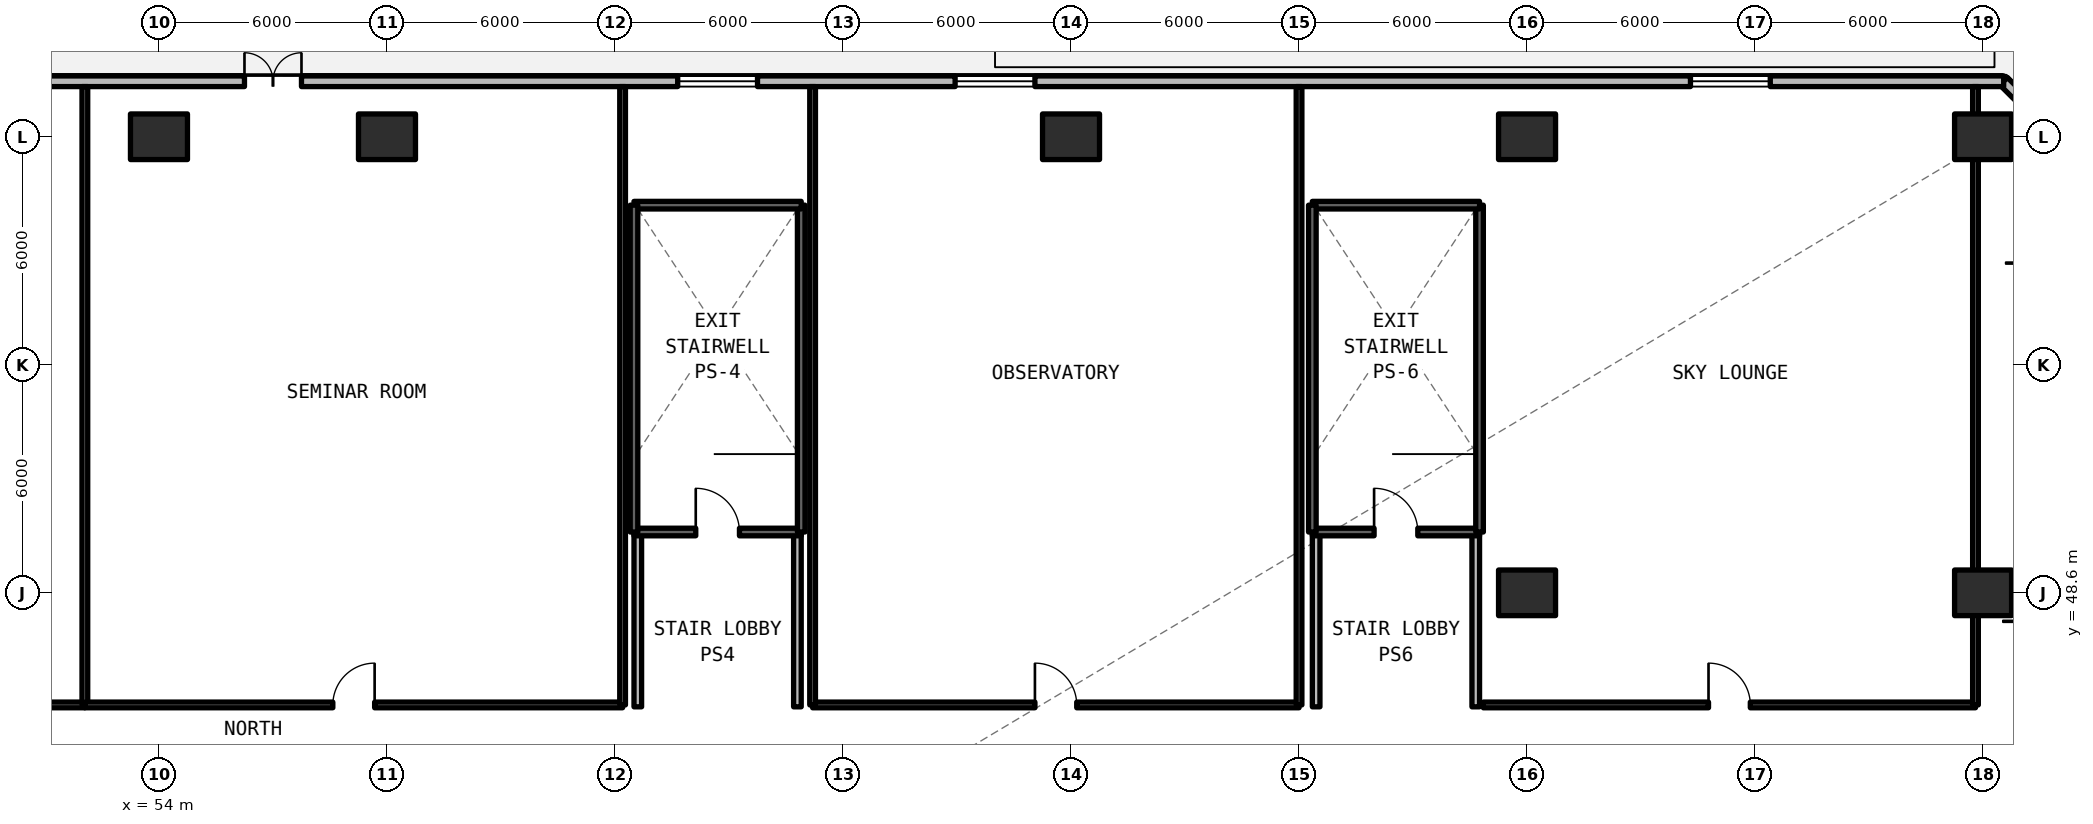
"""IFC4 building model, lengths in metres.
Left out: names, types, materials, properties, quantities, classifications, styles, units other than length and angle.
Written with IfcOpenShell. Run it as: python <this file> out.ifc"""

import sys

from ifc_helpers import new_model, si_unit, direction, frame, frame_2d, origin, origin_2d, place, context, subcontext, project, spatial, rectangle, extrude, element, fill, save


model = new_model("IFC4")
c1 = context("Model", 3, precision=1e-05, world=origin(), true_north=direction((0.0, 1.0)))
c2 = subcontext(c1, "Body", "Model", "MODEL_VIEW")
j1 = project(units=[si_unit("LENGTHUNIT", "METRE"), si_unit("PLANEANGLEUNIT", "RADIAN")], contexts=[c1])
p1 = place(None, origin())
s1 = spatial("IfcSite", under=j1, at=p1, CompositionType="ELEMENT")
p2 = place(p1, origin())
s2 = spatial("IfcBuilding", under=s1, at=p2, CompositionType="ELEMENT")
p3 = place(p2, frame((0.0, 0.0, 24.09)))
s3 = spatial("IfcBuildingStorey", under=s2, at=p3, CompositionType="ELEMENT", Elevation=24.09)
for number, where, z_axis, x_axis in (
    (1, (54.0, 60.6, 0.0), (0.0, 0.0, 1.0), (1.0, 0.0, 0.0)),
    (2, (60.0, 60.6, 0.0), (0.0, 0.0, 1.0), (1.0, 0.0, 0.0)),
    (3, (78.0, 60.6, 0.0), (0.0, 0.0, 1.0), (1.0, 0.0, 0.0)),
    (4, (90.0, 60.6, 0.0), (0.0, 0.0, 1.0), (1.0, 0.0, 0.0)),
    (5, (102.0, 60.6, 0.0), (0.0, 0.0, 1.0), (1.0, 0.0, 0.0)),
):
    element("IfcColumn", number, at=place(p3, frame(where, z_axis=z_axis, x_axis=x_axis)), inside=s3, PredefinedType="COLUMN", context=c2, shape_type="SweptSolid", body=[
        extrude(rectangle(XDim=1.5, YDim=1.2, at=origin_2d()), origin(), (0.0, 0.0, 1.0), 4.71),
    ])
p4 = place(p3, frame((90.0, 48.6, 0.0), z_axis=(0.0, 0.0, 1.0), x_axis=(1.0, 0.0, 0.0)))
e6 = element("IfcColumn", 6, at=p4, inside=s3, PredefinedType="COLUMN", context=c2, shape_type="SweptSolid", body=[
    extrude(rectangle(XDim=1.5, YDim=1.2, at=origin_2d()), origin(), (0.0, 0.0, 1.0), 4.95),
])
p5 = place(p3, frame((102.0, 48.6, 0.0), z_axis=(0.0, 0.0, 1.0), x_axis=(1.0, 0.0, 0.0)))
e7 = element("IfcColumn", 7, at=p5, inside=s3, PredefinedType="COLUMN", context=c2, shape_type="SweptSolid", body=[
    extrude(rectangle(XDim=1.5, YDim=1.2, at=origin_2d()), origin(), (0.0, 0.0, 1.0), 4.71),
])
p6 = place(p3, frame((104.86, 59.742, 0.0), z_axis=(0.0, 0.0, 1.0), x_axis=(-0.707106781187, 0.707106781187, 0.0)))
e8 = element("IfcWall", 8, at=p6, inside=s3, PredefinedType="SOLIDWALL", context=c2, shape_type="SweptSolid", body=[
    extrude(rectangle(XDim=3.278, YDim=0.28, at=frame_2d((1.639, 0.0))), origin(), (0.0, 0.0, 1.0), 4.71),
])
p7 = place(p6, frame((0.894, 0.0, 0.78)))
e9 = element("IfcOpeningElement", 9, at=p7, cuts=e8, PredefinedType="OPENING", context=c2, shape_type="SweptSolid", body=[
    extrude(rectangle(XDim=0.85, YDim=1.65, at=frame_2d((0.425, 0.825))), frame((0.0, 0.15, 0.0), z_axis=(0.0, -1.0, 0.0), x_axis=(1.0, 0.0, 0.0)), (0.0, 0.0, 1.0), 0.3),
])
p8 = place(p3, frame((102.542, 62.06, 0.0), z_axis=(0.0, 0.0, 1.0), x_axis=(-1.0, 0.0, 0.0)))
e10 = element("IfcWall", 10, at=p8, inside=s3, PredefinedType="SOLIDWALL", context=c2, shape_type="SweptSolid", body=[
    extrude(rectangle(XDim=91.084, YDim=0.28, at=frame_2d((45.542, 0.0))), origin(), (0.0, 0.0, 1.0), 4.71),
])
p9 = place(p8, frame((44.792, 0.0, 0.0)))
e11 = element("IfcOpeningElement", 11, at=p9, cuts=e10, PredefinedType="OPENING", context=c2, shape_type="SweptSolid", body=[
    extrude(rectangle(XDim=1.5, YDim=2.2, at=frame_2d((0.75, 1.1))), frame((0.0, 0.15, 0.0), z_axis=(0.0, -1.0, 0.0), x_axis=(1.0, 0.0, 0.0)), (0.0, 0.0, 1.0), 0.3),
])
p10 = place(p8, frame((60.392, 0.0, 0.78)))
e12 = element("IfcOpeningElement", 12, at=p10, cuts=e10, PredefinedType="OPENING", context=c2, shape_type="SweptSolid", body=[
    extrude(rectangle(XDim=2.1, YDim=1.66, at=frame_2d((1.05, 0.83))), frame((0.0, 0.15, 0.0), z_axis=(0.0, -1.0, 0.0), x_axis=(1.0, 0.0, 0.0)), (0.0, 0.0, 1.0), 0.3),
])
p11 = place(p8, frame((25.492, 0.0, 0.78)))
e13 = element("IfcOpeningElement", 13, at=p11, cuts=e10, PredefinedType="OPENING", context=c2, shape_type="SweptSolid", body=[
    extrude(rectangle(XDim=2.1, YDim=1.66, at=frame_2d((1.05, 0.83))), frame((0.0, 0.15, 0.0), z_axis=(0.0, -1.0, 0.0), x_axis=(1.0, 0.0, 0.0)), (0.0, 0.0, 1.0), 0.3),
])
p12 = place(p8, frame((83.092, 0.0, 0.78)))
e14 = element("IfcOpeningElement", 14, at=p12, cuts=e10, PredefinedType="OPENING", context=c2, shape_type="SweptSolid", body=[
    extrude(rectangle(XDim=2.1, YDim=1.66, at=frame_2d((1.05, 0.83))), frame((0.0, 0.15, 0.0), z_axis=(0.0, -1.0, 0.0), x_axis=(1.0, 0.0, 0.0)), (0.0, 0.0, 1.0), 0.3),
])
p13 = place(p8, frame((6.142, 0.0, 0.78)))
e15 = element("IfcOpeningElement", 15, at=p13, cuts=e10, PredefinedType="OPENING", context=c2, shape_type="SweptSolid", body=[
    extrude(rectangle(XDim=2.1, YDim=1.66, at=frame_2d((1.05, 0.83))), frame((0.0, 0.15, 0.0), z_axis=(0.0, -1.0, 0.0), x_axis=(1.0, 0.0, 0.0)), (0.0, 0.0, 1.0), 0.3),
])
p14 = place(p8, frame((32.792, 0.0, 0.78)))
e16 = element("IfcOpeningElement", 16, at=p14, cuts=e10, PredefinedType="OPENING", context=c2, shape_type="SweptSolid", body=[
    extrude(rectangle(XDim=2.1, YDim=1.66, at=frame_2d((1.05, 0.83))), frame((0.0, 0.15, 0.0), z_axis=(0.0, -1.0, 0.0), x_axis=(1.0, 0.0, 0.0)), (0.0, 0.0, 1.0), 0.3),
])
p15 = place(p8, frame((74.092, 0.0, 0.78)))
e17 = element("IfcOpeningElement", 17, at=p15, cuts=e10, PredefinedType="OPENING", context=c2, shape_type="SweptSolid", body=[
    extrude(rectangle(XDim=2.1, YDim=1.66, at=frame_2d((1.05, 0.83))), frame((0.0, 0.15, 0.0), z_axis=(0.0, -1.0, 0.0), x_axis=(1.0, 0.0, 0.0)), (0.0, 0.0, 1.0), 0.3),
])
p16 = place(p8, frame((53.992, 0.0, 0.78)))
e18 = element("IfcOpeningElement", 18, at=p16, cuts=e10, PredefinedType="OPENING", context=c2, shape_type="SweptSolid", body=[
    extrude(rectangle(XDim=2.1, YDim=1.66, at=frame_2d((1.05, 0.83))), frame((0.0, 0.15, 0.0), z_axis=(0.0, -1.0, 0.0), x_axis=(1.0, 0.0, 0.0)), (0.0, 0.0, 1.0), 0.3),
])
p17 = place(p8, frame((63.492, 0.0, 0.78)))
e19 = element("IfcOpeningElement", 19, at=p17, cuts=e10, PredefinedType="OPENING", context=c2, shape_type="SweptSolid", body=[
    extrude(rectangle(XDim=2.1, YDim=1.66, at=frame_2d((1.05, 0.83))), frame((0.0, 0.15, 0.0), z_axis=(0.0, -1.0, 0.0), x_axis=(1.0, 0.0, 0.0)), (0.0, 0.0, 1.0), 0.3),
])
for number, where, z_axis, x_axis in (
    (20, (66.6, 45.6, 0.0), (0.0, 0.0, 1.0), (0.0, 1.0, 0.0)),
    (21, (70.8, 45.6, 0.0), (0.0, 0.0, 1.0), (0.0, 1.0, 0.0)),
    (22, (84.45, 45.6, 0.0), (0.0, 0.0, 1.0), (0.0, 1.0, 0.0)),
    (23, (88.65, 45.6, 0.0), (0.0, 0.0, 1.0), (0.0, 1.0, 0.0)),
):
    element("IfcWall", number, at=place(p3, frame(where, z_axis=z_axis, x_axis=x_axis)), inside=s3, PredefinedType="SOLIDWALL", context=c2, shape_type="SweptSolid", body=[
        extrude(rectangle(XDim=4.6, YDim=0.2, at=frame_2d((2.3, 0.0))), origin(), (0.0, 0.0, 1.0), 3.93),
    ])
p18 = place(p3, frame((30.2, 45.65, 0.0), z_axis=(0.0, 0.0, 1.0), x_axis=(1.0, 0.0, 0.0)))
e24 = element("IfcWall", 24, at=p18, inside=s3, PredefinedType="SOLIDWALL", context=c2, shape_type="SweptSolid", body=[
    extrude(rectangle(XDim=21.85, YDim=0.15, at=frame_2d((10.925, 0.0))), origin(), (0.0, 0.0, 1.0), 3.93),
])
p19 = place(p18, frame((10.225, 0.0, 0.0)))
e25 = element("IfcOpeningElement", 25, at=p19, cuts=e24, PredefinedType="OPENING", context=c2, shape_type="SweptSolid", body=[
    extrude(rectangle(XDim=1.4, YDim=2.15, at=frame_2d((0.7, 1.075))), frame((0.0, 0.085, 0.0), z_axis=(0.0, -1.0, 0.0), x_axis=(1.0, 0.0, 0.0)), (0.0, 0.0, 1.0), 0.17),
])
p20 = place(p3, frame((52.05, 45.65, 0.0), z_axis=(0.0, 0.0, 1.0), x_axis=(0.0, 1.0, 0.0)))
e26 = element("IfcWall", 26, at=p20, inside=s3, PredefinedType="SOLIDWALL", context=c2, shape_type="SweptSolid", body=[
    extrude(rectangle(XDim=16.27, YDim=0.15, at=frame_2d((8.135, 0.0))), origin(), (0.0, 0.0, 1.0), 3.93),
])
p21 = place(p3, frame((52.05, 45.65, 0.0), z_axis=(0.0, 0.0, 1.0), x_axis=(1.0, 0.0, 0.0)))
e27 = element("IfcWall", 27, at=p21, inside=s3, PredefinedType="SOLIDWALL", context=c2, shape_type="SweptSolid", body=[
    extrude(rectangle(XDim=14.15, YDim=0.15, at=frame_2d((7.075, 0.0))), origin(), (0.0, 0.0, 1.0), 3.93),
])
p22 = place(p21, frame((6.525, 0.0, 0.0)))
e28 = element("IfcOpeningElement", 28, at=p22, cuts=e27, PredefinedType="OPENING", context=c2, shape_type="SweptSolid", body=[
    extrude(rectangle(XDim=1.1, YDim=2.15, at=frame_2d((0.55, 1.075))), frame((0.0, 0.085, 0.0), z_axis=(0.0, -1.0, 0.0), x_axis=(1.0, 0.0, 0.0)), (0.0, 0.0, 1.0), 0.17),
])
p23 = place(p3, frame((66.2, 45.65, 0.0), z_axis=(0.0, 0.0, 1.0), x_axis=(0.0, 1.0, 0.0)))
e29 = element("IfcWall", 29, at=p23, inside=s3, PredefinedType="SOLIDWALL", context=c2, shape_type="SweptSolid", body=[
    extrude(rectangle(XDim=16.27, YDim=0.15, at=frame_2d((8.135, 0.0))), origin(), (0.0, 0.0, 1.0), 3.687),
])
p24 = place(p3, frame((71.2, 45.65, 0.0), z_axis=(0.0, 0.0, 1.0), x_axis=(1.0, 0.0, 0.0)))
e30 = element("IfcWall", 30, at=p24, inside=s3, PredefinedType="SOLIDWALL", context=c2, shape_type="SweptSolid", body=[
    extrude(rectangle(XDim=12.8, YDim=0.15, at=frame_2d((6.4, 0.0))), origin(), (0.0, 0.0, 1.0), 3.93),
])
p25 = place(p24, frame((5.85, 0.0, 0.0)))
e31 = element("IfcOpeningElement", 31, at=p25, cuts=e30, PredefinedType="OPENING", context=c2, shape_type="SweptSolid", body=[
    extrude(rectangle(XDim=1.1, YDim=2.15, at=frame_2d((0.55, 1.075))), frame((0.0, 0.085, 0.0), z_axis=(0.0, -1.0, 0.0), x_axis=(1.0, 0.0, 0.0)), (0.0, 0.0, 1.0), 0.17),
])
p26 = place(p3, frame((71.2, 45.65, 0.0), z_axis=(0.0, 0.0, 1.0), x_axis=(0.0, 1.0, 0.0)))
e32 = element("IfcWall", 32, at=p26, inside=s3, PredefinedType="SOLIDWALL", context=c2, shape_type="SweptSolid", body=[
    extrude(rectangle(XDim=16.27, YDim=0.15, at=frame_2d((8.135, 0.0))), origin(), (0.0, 0.0, 1.0), 3.93),
])
p27 = place(p3, frame((84.0, 45.65, 0.0), z_axis=(0.0, 0.0, 1.0), x_axis=(0.0, 1.0, 0.0)))
e33 = element("IfcWall", 33, at=p27, inside=s3, PredefinedType="SOLIDWALL", context=c2, shape_type="SweptSolid", body=[
    extrude(rectangle(XDim=16.27, YDim=0.15, at=frame_2d((8.135, 0.0))), origin(), (0.0, 0.0, 1.0), 3.687),
])
p28 = place(p3, frame((88.85, 45.65, 0.0), z_axis=(0.0, 0.0, 1.0), x_axis=(1.0, 0.0, 0.0)))
e34 = element("IfcWall", 34, at=p28, inside=s3, PredefinedType="SOLIDWALL", context=c2, shape_type="SweptSolid", body=[
    extrude(rectangle(XDim=12.95, YDim=0.15, at=frame_2d((6.475, 0.0))), origin(), (0.0, 0.0, 1.0), 3.93),
])
p29 = place(p28, frame((5.925, 0.0, 0.0)))
e35 = element("IfcOpeningElement", 35, at=p29, cuts=e34, PredefinedType="OPENING", context=c2, shape_type="SweptSolid", body=[
    extrude(rectangle(XDim=1.1, YDim=2.15, at=frame_2d((0.55, 1.075))), frame((0.0, 0.085, 0.0), z_axis=(0.0, -1.0, 0.0), x_axis=(1.0, 0.0, 0.0)), (0.0, 0.0, 1.0), 0.17),
])
p30 = place(p3, frame((101.8, 45.65, 0.0), z_axis=(0.0, 0.0, 1.0), x_axis=(0.0, 1.0, 0.0)))
e36 = element("IfcWall", 36, at=p30, inside=s3, PredefinedType="SOLIDWALL", context=c2, shape_type="SweptSolid", body=[
    extrude(rectangle(XDim=16.27, YDim=0.15, at=frame_2d((8.135, 0.0))), origin(), (0.0, 0.0, 1.0), 3.93),
])
p31 = place(p3, frame((66.5, 50.2, 0.0), z_axis=(0.0, 0.0, 1.0), x_axis=(1.0, 0.0, 0.0)))
e37 = element("IfcWall", 37, at=p31, inside=s3, PredefinedType="SOLIDWALL", context=c2, shape_type="SweptSolid", body=[
    extrude(rectangle(XDim=4.4, YDim=0.2, at=frame_2d((2.2, 0.0))), origin(), (0.0, 0.0, 1.0), 4.95),
])
p32 = place(p31, frame((1.625, 0.0, 0.0)))
e38 = element("IfcOpeningElement", 38, at=p32, cuts=e37, PredefinedType="OPENING", context=c2, shape_type="SweptSolid", body=[
    extrude(rectangle(XDim=1.15, YDim=2.15, at=frame_2d((0.575, 1.075))), frame((0.0, 0.11, 0.0), z_axis=(0.0, -1.0, 0.0), x_axis=(1.0, 0.0, 0.0)), (0.0, 0.0, 1.0), 0.22),
])
p33 = place(p3, frame((70.9, 50.2, 0.0), z_axis=(0.0, 0.0, 1.0), x_axis=(0.0, 1.0, 0.0)))
e39 = element("IfcWall", 39, at=p33, inside=s3, PredefinedType="SOLIDWALL", context=c2, shape_type="SweptSolid", body=[
    extrude(rectangle(XDim=8.6, YDim=0.2, at=frame_2d((4.3, 0.0))), origin(), (0.0, 0.0, 1.0), 4.95),
])
p34 = place(p3, frame((70.9, 58.8, 0.0), z_axis=(0.0, 0.0, 1.0), x_axis=(-1.0, 0.0, 0.0)))
e40 = element("IfcWall", 40, at=p34, inside=s3, PredefinedType="SOLIDWALL", context=c2, shape_type="SweptSolid", body=[
    extrude(rectangle(XDim=4.4, YDim=0.2, at=frame_2d((2.2, 0.0))), origin(), (0.0, 0.0, 1.0), 4.95),
])
p35 = place(p3, frame((66.5, 58.8, 0.0), z_axis=(0.0, 0.0, 1.0), x_axis=(0.0, -1.0, 0.0)))
e41 = element("IfcWall", 41, at=p35, inside=s3, PredefinedType="SOLIDWALL", context=c2, shape_type="SweptSolid", body=[
    extrude(rectangle(XDim=8.6, YDim=0.2, at=frame_2d((4.3, 0.0))), origin(), (0.0, 0.0, 1.0), 4.95),
])
p36 = place(p3, frame((84.35, 50.2, 0.0), z_axis=(0.0, 0.0, 1.0), x_axis=(1.0, 0.0, 0.0)))
e42 = element("IfcWall", 42, at=p36, inside=s3, PredefinedType="SOLIDWALL", context=c2, shape_type="SweptSolid", body=[
    extrude(rectangle(XDim=4.4, YDim=0.2, at=frame_2d((2.2, 0.0))), origin(), (0.0, 0.0, 1.0), 4.95),
])
p37 = place(p36, frame((1.625, 0.0, 0.0)))
e43 = element("IfcOpeningElement", 43, at=p37, cuts=e42, PredefinedType="OPENING", context=c2, shape_type="SweptSolid", body=[
    extrude(rectangle(XDim=1.15, YDim=2.15, at=frame_2d((0.575, 1.075))), frame((0.0, 0.11, 0.0), z_axis=(0.0, -1.0, 0.0), x_axis=(1.0, 0.0, 0.0)), (0.0, 0.0, 1.0), 0.22),
])
p38 = place(p3, frame((88.75, 50.2, 0.0), z_axis=(0.0, 0.0, 1.0), x_axis=(0.0, 1.0, 0.0)))
e44 = element("IfcWall", 44, at=p38, inside=s3, PredefinedType="SOLIDWALL", context=c2, shape_type="SweptSolid", body=[
    extrude(rectangle(XDim=8.6, YDim=0.2, at=frame_2d((4.3, 0.0))), origin(), (0.0, 0.0, 1.0), 4.95),
])
p39 = place(p3, frame((88.75, 58.8, 0.0), z_axis=(0.0, 0.0, 1.0), x_axis=(-1.0, 0.0, 0.0)))
e45 = element("IfcWall", 45, at=p39, inside=s3, PredefinedType="SOLIDWALL", context=c2, shape_type="SweptSolid", body=[
    extrude(rectangle(XDim=4.4, YDim=0.2, at=frame_2d((2.2, 0.0))), origin(), (0.0, 0.0, 1.0), 4.95),
])
p40 = place(p3, frame((84.35, 58.8, 0.0), z_axis=(0.0, 0.0, 1.0), x_axis=(0.0, -1.0, 0.0)))
e46 = element("IfcWall", 46, at=p40, inside=s3, PredefinedType="SOLIDWALL", context=c2, shape_type="SweptSolid", body=[
    extrude(rectangle(XDim=8.6, YDim=0.2, at=frame_2d((4.3, 0.0))), origin(), (0.0, 0.0, 1.0), 4.95),
])
p41 = place(p9, frame((1.5, 0.0, 0.0), z_axis=(0.0, 0.0, 1.0), x_axis=(-1.0, 0.0, 0.0)))
e47 = element("IfcDoor", 47, at=p41, inside=s3, OperationType="SINGLE_SWING_LEFT", PredefinedType="DOOR", context=c2, shape_type="SweptSolid", body=[
    extrude(rectangle(XDim=1.5, YDim=2.2, at=frame_2d((0.75, 1.1))), frame((0.0, 0.025, 0.0), z_axis=(0.0, -1.0, 0.0), x_axis=(1.0, 0.0, 0.0)), (0.0, 0.0, 1.0), 0.05),
])
fill(e11, e47)
p42 = place(p11, origin())
e48 = element("IfcWindow", 48, at=p42, inside=s3, PartitioningType="SINGLE_PANEL", PredefinedType="WINDOW", context=c2, shape_type="SweptSolid", body=[
    extrude(rectangle(XDim=2.1, YDim=1.66, at=frame_2d((1.05, 0.83))), frame((0.0, 0.03, 0.0), z_axis=(0.0, -1.0, 0.0), x_axis=(1.0, 0.0, 0.0)), (0.0, 0.0, 1.0), 0.06),
])
fill(e13, e48)
p43 = place(p13, origin())
e49 = element("IfcWindow", 49, at=p43, inside=s3, PartitioningType="SINGLE_PANEL", PredefinedType="WINDOW", context=c2, shape_type="SweptSolid", body=[
    extrude(rectangle(XDim=2.1, YDim=1.66, at=frame_2d((1.05, 0.83))), frame((0.0, 0.03, 0.0), z_axis=(0.0, -1.0, 0.0), x_axis=(1.0, 0.0, 0.0)), (0.0, 0.0, 1.0), 0.06),
])
fill(e15, e49)
p44 = place(p14, origin())
e50 = element("IfcWindow", 50, at=p44, inside=s3, PartitioningType="SINGLE_PANEL", PredefinedType="WINDOW", context=c2, shape_type="SweptSolid", body=[
    extrude(rectangle(XDim=2.1, YDim=1.66, at=frame_2d((1.05, 0.83))), frame((0.0, 0.03, 0.0), z_axis=(0.0, -1.0, 0.0), x_axis=(1.0, 0.0, 0.0)), (0.0, 0.0, 1.0), 0.06),
])
fill(e16, e50)
p45 = place(p22, origin())
e51 = element("IfcDoor", 51, at=p45, inside=s3, OperationType="SINGLE_SWING_RIGHT", PredefinedType="DOOR", context=c2, shape_type="SweptSolid", body=[
    extrude(rectangle(XDim=1.1, YDim=2.15, at=frame_2d((0.55, 1.075))), frame((0.0, 0.025, 0.0), z_axis=(0.0, -1.0, 0.0), x_axis=(1.0, 0.0, 0.0)), (0.0, 0.0, 1.0), 0.05),
])
fill(e28, e51)
p46 = place(p25, origin())
e52 = element("IfcDoor", 52, at=p46, inside=s3, OperationType="SINGLE_SWING_LEFT", PredefinedType="DOOR", context=c2, shape_type="SweptSolid", body=[
    extrude(rectangle(XDim=1.1, YDim=2.15, at=frame_2d((0.55, 1.075))), frame((0.0, 0.025, 0.0), z_axis=(0.0, -1.0, 0.0), x_axis=(1.0, 0.0, 0.0)), (0.0, 0.0, 1.0), 0.05),
])
fill(e31, e52)
p47 = place(p29, origin())
e53 = element("IfcDoor", 53, at=p47, inside=s3, OperationType="SINGLE_SWING_LEFT", PredefinedType="DOOR", context=c2, shape_type="SweptSolid", body=[
    extrude(rectangle(XDim=1.1, YDim=2.15, at=frame_2d((0.55, 1.075))), frame((0.0, 0.025, 0.0), z_axis=(0.0, -1.0, 0.0), x_axis=(1.0, 0.0, 0.0)), (0.0, 0.0, 1.0), 0.05),
])
fill(e35, e53)
p48 = place(p32, origin())
e54 = element("IfcDoor", 54, at=p48, inside=s3, OperationType="SINGLE_SWING_LEFT", PredefinedType="DOOR", context=c2, shape_type="SweptSolid", body=[
    extrude(rectangle(XDim=1.15, YDim=2.15, at=frame_2d((0.575, 1.075))), frame((0.0, 0.025, 0.0), z_axis=(0.0, -1.0, 0.0), x_axis=(1.0, 0.0, 0.0)), (0.0, 0.0, 1.0), 0.05),
])
fill(e38, e54)
p49 = place(p37, origin())
e55 = element("IfcDoor", 55, at=p49, inside=s3, OperationType="SINGLE_SWING_LEFT", PredefinedType="DOOR", context=c2, shape_type="SweptSolid", body=[
    extrude(rectangle(XDim=1.15, YDim=2.15, at=frame_2d((0.575, 1.075))), frame((0.0, 0.025, 0.0), z_axis=(0.0, -1.0, 0.0), x_axis=(1.0, 0.0, 0.0)), (0.0, 0.0, 1.0), 0.05),
])
fill(e43, e55)
save(model, sys.argv[1])
